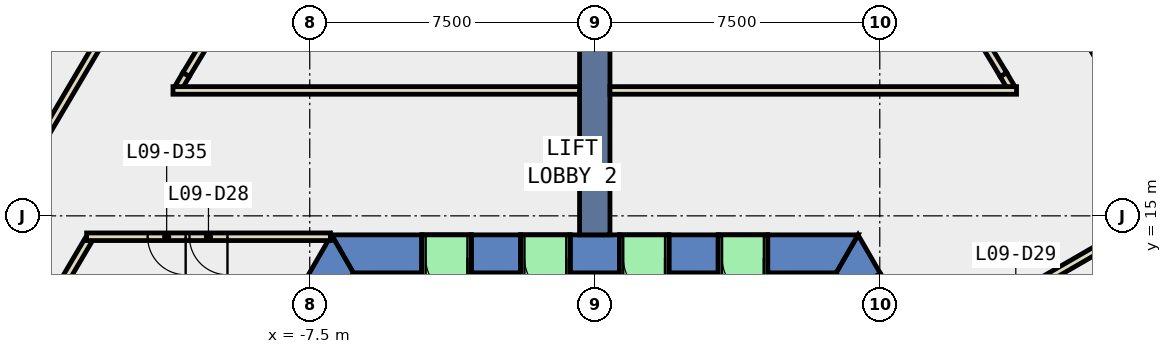
"""IFC4 building model, lengths in metres.
Left out: names, types, materials, properties, quantities, classifications, styles, units other than length and angle.
Written with IfcOpenShell. Run it as: python <this file> out.ifc"""

import sys

from ifc_helpers import new_model, si_unit, direction, frame, frame_2d, origin, place, context, subcontext, project, spatial, polyline, rectangle, outline, extrude, element, fill, save


model = new_model("IFC4")
c1 = context("Model", 3, precision=1e-05, world=origin(), true_north=direction((0.0, 1.0)))
c2 = subcontext(c1, "Body", "Model", "MODEL_VIEW")
j1 = project(units=[si_unit("LENGTHUNIT", "METRE"), si_unit("PLANEANGLEUNIT", "RADIAN")], contexts=[c1])
p1 = place(None, origin())
s1 = spatial("IfcSite", under=j1, at=p1, CompositionType="ELEMENT")
p2 = place(p1, origin())
s2 = spatial("IfcBuilding", under=s1, at=p2, CompositionType="ELEMENT")
p3 = place(p2, frame((0.0, 0.0, 47.6)))
s3 = spatial("IfcBuildingStorey", under=s2, at=p3, CompositionType="ELEMENT", Elevation=47.6)
p4 = place(p3, frame((0.0, 0.0, -0.4)))
e1 = element("IfcWall", 1, at=p4, inside=s3, PredefinedType="SHEAR", context=c2, shape_type="SweptSolid", body=[
    extrude(outline(polyline([(6.651, 12.98), (7.517, 13.48), (6.928, 14.5), (6.351, 13.5), (6.651, 12.98)])), origin(), (0.0, 0.0, 1.0), 4.2),
])
p5 = place(p3, frame((0.0, 0.0, 3.6)))
e2 = element("IfcWall", 2, at=p5, inside=s3, PredefinedType="SHEAR", context=c2, shape_type="SweptSolid", body=[
    extrude(outline(polyline([(7.517, 13.48), (6.651, 12.98), (7.651, 11.248), (8.517, 11.748), (7.517, 13.48)])), origin(), (0.0, 0.0, 1.0), 0.2),
])
p6 = place(p3, frame((0.0, 0.0, -0.4)))
e3 = element("IfcWall", 3, at=p6, inside=s3, PredefinedType="SHEAR", context=c2, shape_type="SweptSolid", body=[
    extrude(outline(polyline([(4.55, 14.5), (4.55, 13.5), (6.351, 13.5), (6.928, 14.5), (4.55, 14.5)])), origin(), (0.0, 0.0, 1.0), 4.2),
])
p7 = place(p3, frame((0.0, 0.0, -0.4)))
e4 = element("IfcWall", 4, at=p7, inside=s3, PredefinedType="SHEAR", context=c2, shape_type="SweptSolid", body=[
    extrude(outline(polyline([(1.95, 14.5), (1.95, 13.5), (3.25, 13.5), (3.25, 14.5), (1.95, 14.5)])), origin(), (0.0, 0.0, 1.0), 4.2),
])
p8 = place(p3, frame((0.0, 0.0, -0.4)))
e5 = element("IfcWall", 5, at=p8, inside=s3, PredefinedType="SHEAR", context=c2, shape_type="SweptSolid", body=[
    extrude(outline(polyline([(-0.65, 14.5), (-0.65, 13.5), (0.65, 13.5), (0.65, 14.5), (-0.65, 14.5)])), origin(), (0.0, 0.0, 1.0), 4.2),
])
p9 = place(p3, frame((0.0, 0.0, -0.4)))
e6 = element("IfcWall", 6, at=p9, inside=s3, PredefinedType="SHEAR", context=c2, shape_type="SweptSolid", body=[
    extrude(outline(polyline([(-3.25, 14.5), (-3.25, 13.5), (-1.95, 13.5), (-1.95, 14.5), (-3.25, 14.5)])), origin(), (0.0, 0.0, 1.0), 4.2),
])
p10 = place(p3, frame((0.0, 0.0, -0.4)))
e7 = element("IfcWall", 7, at=p10, inside=s3, PredefinedType="SHEAR", context=c2, shape_type="SweptSolid", body=[
    extrude(outline(polyline([(-4.55, 13.5), (-4.55, 14.5), (-6.928, 14.5), (-6.351, 13.5), (-4.55, 13.5)])), origin(), (0.0, 0.0, 1.0), 4.2),
])
p11 = place(p3, frame((0.0, 0.0, 3.6)))
e8 = element("IfcWall", 8, at=p11, inside=s3, PredefinedType="SHEAR", context=c2, shape_type="SweptSolid", body=[
    extrude(outline(polyline([(3.25, 14.5), (3.25, 13.5), (4.55, 13.5), (4.55, 14.5), (3.25, 14.5)])), origin(), (0.0, 0.0, 1.0), 0.2),
])
p12 = place(p3, frame((0.0, 0.0, 3.6)))
e9 = element("IfcWall", 9, at=p12, inside=s3, PredefinedType="SHEAR", context=c2, shape_type="SweptSolid", body=[
    extrude(outline(polyline([(0.65, 14.5), (0.65, 13.5), (1.95, 13.5), (1.95, 14.5), (0.65, 14.5)])), origin(), (0.0, 0.0, 1.0), 0.2),
])
p13 = place(p3, frame((0.0, 0.0, 3.6)))
e10 = element("IfcWall", 10, at=p13, inside=s3, PredefinedType="SHEAR", context=c2, shape_type="SweptSolid", body=[
    extrude(outline(polyline([(-1.95, 14.5), (-1.95, 13.5), (-0.65, 13.5), (-0.65, 14.5), (-1.95, 14.5)])), origin(), (0.0, 0.0, 1.0), 0.2),
])
p14 = place(p3, frame((0.0, 0.0, 3.6)))
e11 = element("IfcWall", 11, at=p14, inside=s3, PredefinedType="SHEAR", context=c2, shape_type="SweptSolid", body=[
    extrude(outline(polyline([(-4.55, 14.5), (-4.55, 13.5), (-3.25, 13.5), (-3.25, 14.5), (-4.55, 14.5)])), origin(), (0.0, 0.0, 1.0), 0.2),
])
p15 = place(p3, frame((0.0, 0.0, -0.4)))
e12 = element("IfcWall", 12, at=p15, inside=s3, PredefinedType="SHEAR", context=c2, shape_type="SweptSolid", body=[
    extrude(outline(polyline([(-12.267, 5.252), (-11.402, 4.752), (-6.351, 13.5), (-6.928, 14.5), (-12.267, 5.252)])), origin(), (0.0, 0.0, 1.0), 4.2),
])
p16 = place(p3, frame((0.0, 14.5, -0.4), z_axis=(0.0, 0.0, 1.0), x_axis=(0.0, 1.0, 0.0)))
e13 = element("IfcWall", 13, at=p16, inside=s3, PredefinedType="SHEAR", context=c2, shape_type="SweptSolid", body=[
    extrude(rectangle(XDim=9.0, YDim=0.8, at=frame_2d((4.5, 0.0))), origin(), (0.0, 0.0, 1.0), 4.2),
])
p17 = place(p3, frame((-13.323, 14.364, 0.0), z_axis=(0.0, 0.0, 1.0), x_axis=(-0.508274698505, -0.861195001646, 0.0)))
e14 = element("IfcWall", 14, at=p17, inside=s3, PredefinedType="PARTITIONING", context=c2, shape_type="SweptSolid", body=[
    extrude(rectangle(XDim=1.828, YDim=0.2, at=frame_2d((0.914, 0.0))), origin(), (0.0, 0.0, 1.0), 3.8),
])
p18 = place(p3, frame((13.492, 14.274, 0.0), z_axis=(0.0, 0.0, 1.0), x_axis=(-0.866003598361, -0.5000377662, 0.0)))
e15 = element("IfcWall", 15, at=p18, inside=s3, PredefinedType="PARTITIONING", context=c2, shape_type="SweptSolid", body=[
    extrude(rectangle(XDim=5.071, YDim=0.2, at=frame_2d((2.536, 0.0))), origin(), (0.0, 0.0, 1.0), 3.8),
])
p19 = place(p18, frame((2.286, 0.0, 0.0)))
e16 = element("IfcOpeningElement", 16, at=p19, cuts=e15, PredefinedType="OPENING", context=c2, shape_type="SweptSolid", body=[
    extrude(rectangle(XDim=1.0, YDim=2.1, at=frame_2d((0.5, 1.05))), frame((0.0, 0.11, 0.0), z_axis=(0.0, -1.0, 0.0), x_axis=(1.0, 0.0, 0.0)), (0.0, 0.0, 1.0), 0.22),
])
p20 = place(p3, frame((10.948, 18.386, 0.0), z_axis=(0.0, 0.0, 1.0), x_axis=(-0.506880801681, 0.862016155815, 0.0)))
e17 = element("IfcWall", 17, at=p20, inside=s3, PredefinedType="PARTITIONING", context=c2, shape_type="SweptSolid", body=[
    extrude(rectangle(XDim=0.383, YDim=0.2, at=frame_2d((0.191, 0.0))), origin(), (0.0, 0.0, 1.0), 3.8),
])
p21 = place(p3, frame((10.754, 18.716, 0.0), z_axis=(0.0, 0.0, 1.0), x_axis=(-0.516755973305, 0.856132737403, 0.0)))
e18 = element("IfcWall", 18, at=p21, inside=s3, PredefinedType="PARTITIONING", context=c2, shape_type="SweptSolid", body=[
    extrude(rectangle(XDim=7.222, YDim=0.2, at=frame_2d((3.611, 0.0))), origin(), (0.0, 0.0, 1.0), 3.8),
])
p22 = place(p21, frame((3.111, 0.0, 0.0)))
e19 = element("IfcOpeningElement", 19, at=p22, cuts=e18, PredefinedType="OPENING", context=c2, shape_type="SweptSolid", body=[
    extrude(rectangle(XDim=1.0, YDim=2.1, at=frame_2d((0.5, 1.05))), frame((0.0, 0.11, 0.0), z_axis=(0.0, -1.0, 0.0), x_axis=(1.0, 0.0, 0.0)), (0.0, 0.0, 1.0), 0.22),
])
p23 = place(p3, frame((-7.022, 24.899, 0.0), z_axis=(0.0, 0.0, 1.0), x_axis=(-0.516755973305, -0.856132737403, 0.0)))
e20 = element("IfcWall", 20, at=p23, inside=s3, PredefinedType="PARTITIONING", context=c2, shape_type="SweptSolid", body=[
    extrude(rectangle(XDim=7.222, YDim=0.2, at=frame_2d((3.611, 0.0))), origin(), (0.0, 0.0, 1.0), 3.8),
])
p24 = place(p23, frame((3.111, 0.0, 0.0)))
e21 = element("IfcOpeningElement", 21, at=p24, cuts=e20, PredefinedType="OPENING", context=c2, shape_type="SweptSolid", body=[
    extrude(rectangle(XDim=1.0, YDim=2.1, at=frame_2d((0.5, 1.05))), frame((0.0, 0.11, 0.0), z_axis=(0.0, -1.0, 0.0), x_axis=(1.0, 0.0, 0.0)), (0.0, 0.0, 1.0), 0.22),
])
p25 = place(p3, frame((-10.754, 18.716, 0.0), z_axis=(0.0, 0.0, 1.0), x_axis=(-0.506880801681, -0.862016155815, 0.0)))
e22 = element("IfcWall", 22, at=p25, inside=s3, PredefinedType="PARTITIONING", context=c2, shape_type="SweptSolid", body=[
    extrude(rectangle(XDim=0.383, YDim=0.2, at=frame_2d((0.191, 0.0))), origin(), (0.0, 0.0, 1.0), 3.8),
])
p26 = place(p3, frame((12.815, 19.946, 0.0), z_axis=(0.0, 0.0, 1.0), x_axis=(0.508287536166, -0.861187424768, 0.0)))
e23 = element("IfcWall", 23, at=p26, inside=s3, PredefinedType="PARTITIONING", context=c2, shape_type="SweptSolid", body=[
    extrude(rectangle(XDim=7.169, YDim=0.2, at=frame_2d((3.584, 0.0))), origin(), (0.0, 0.0, 1.0), 3.8),
])
p27 = place(p3, frame((-14.618, 16.891, 0.0), z_axis=(0.0, 0.0, 1.0), x_axis=(0.508267810274, 0.861199067022, 0.0)))
e24 = element("IfcWall", 24, at=p27, inside=s3, PredefinedType="PARTITIONING", context=c2, shape_type="SweptSolid", body=[
    extrude(rectangle(XDim=3.547, YDim=0.2, at=frame_2d((1.774, 0.0))), origin(), (0.0, 0.0, 1.0), 3.8),
])
p28 = place(p3, frame((-6.957, 14.45, 0.0), z_axis=(0.0, 0.0, 1.0), x_axis=(-1.0, 0.0, 0.0)))
e25 = element("IfcWall", 25, at=p28, inside=s3, PredefinedType="PARTITIONING", context=c2, shape_type="SweptSolid", body=[
    extrude(rectangle(XDim=6.415, YDim=0.2, at=frame_2d((3.208, 0.0))), origin(), (0.0, 0.0, 1.0), 3.8),
])
p29 = place(p28, frame((2.708, 0.0, 0.0)))
e26 = element("IfcOpeningElement", 26, at=p29, cuts=e25, PredefinedType="OPENING", context=c2, shape_type="SweptSolid", body=[
    extrude(rectangle(XDim=1.0, YDim=2.1, at=frame_2d((0.5, 1.05))), frame((0.0, 0.11, 0.0), z_axis=(0.0, -1.0, 0.0), x_axis=(1.0, 0.0, 0.0)), (0.0, 0.0, 1.0), 0.22),
])
p30 = place(p28, frame((3.808, 0.0, 0.0)))
e27 = element("IfcOpeningElement", 27, at=p30, cuts=e25, PredefinedType="OPENING", context=c2, shape_type="SweptSolid", body=[
    extrude(rectangle(XDim=1.0, YDim=2.1, at=frame_2d((0.5, 1.05))), frame((0.0, 0.11, 0.0), z_axis=(0.0, -1.0, 0.0), x_axis=(1.0, 0.0, 0.0)), (0.0, 0.0, 1.0), 0.22),
])
for number, where, z_axis, x_axis in (
    (28, (0.4, 18.3, 0.0), (0.0, 0.0, 1.0), (1.0, 0.0, 0.0)),
    (29, (-11.099, 18.3, 0.0), (0.0, 0.0, 1.0), (1.0, 0.0, 0.0)),
):
    element("IfcWall", number, at=place(p3, frame(where, z_axis=z_axis, x_axis=x_axis)), inside=s3, PredefinedType="PARTITIONING", context=c2, shape_type="SweptSolid", body=[
        extrude(rectangle(XDim=10.699, YDim=0.2, at=frame_2d((5.35, 0.0))), origin(), (0.0, 0.0, 1.0), 3.8),
    ])
p31 = place(p3, frame((8.43, 11.698, 0.0), z_axis=(0.0, 0.0, 1.0), x_axis=(-0.50002537861, 0.866010750942, 0.0)))
e30 = element("IfcWall", 30, at=p31, inside=s3, PredefinedType="PARTITIONING", context=c2, shape_type="SweptSolid", body=[
    extrude(rectangle(XDim=2.0, YDim=0.2, at=frame_2d((1.0, 0.0))), origin(), (0.0, 0.0, 1.0), 2.4),
])
p32 = place(p31, frame((0.19, 0.0, 0.0)))
e31 = element("IfcOpeningElement", 31, at=p32, cuts=e30, PredefinedType="OPENING", context=c2, shape_type="SweptSolid", body=[
    extrude(rectangle(XDim=1.8, YDim=2.1, at=frame_2d((0.9, 1.05))), frame((0.0, 0.11, 0.0), z_axis=(0.0, -1.0, 0.0), x_axis=(1.0, 0.0, 0.0)), (0.0, 0.0, 1.0), 0.22),
])
p33 = place(p3, frame((4.55, 13.9, 0.0), z_axis=(0.0, 0.0, 1.0), x_axis=(-1.0, 0.0, 0.0)))
e32 = element("IfcWall", 32, at=p33, inside=s3, PredefinedType="STANDARD", context=c2, shape_type="SweptSolid", body=[
    extrude(rectangle(XDim=1.3, YDim=1.2, at=frame_2d((0.65, 0.0))), origin(), (0.0, 0.0, 1.0), 2.4),
])
p34 = place(p33, frame((0.1, 0.0, 0.0)))
e33 = element("IfcOpeningElement", 33, at=p34, cuts=e32, PredefinedType="OPENING", context=c2, shape_type="SweptSolid", body=[
    extrude(rectangle(XDim=1.1, YDim=2.3, at=frame_2d((0.55, 1.15))), frame((0.0, 0.61, 0.0), z_axis=(0.0, -1.0, 0.0), x_axis=(1.0, 0.0, 0.0)), (0.0, 0.0, 1.0), 1.22),
])
p35 = place(p3, frame((1.95, 13.9, 0.0), z_axis=(0.0, 0.0, 1.0), x_axis=(-1.0, 0.0, 0.0)))
e34 = element("IfcWall", 34, at=p35, inside=s3, PredefinedType="STANDARD", context=c2, shape_type="SweptSolid", body=[
    extrude(rectangle(XDim=1.3, YDim=1.2, at=frame_2d((0.65, 0.0))), origin(), (0.0, 0.0, 1.0), 2.4),
])
p36 = place(p35, frame((0.1, 0.0, 0.0)))
e35 = element("IfcOpeningElement", 35, at=p36, cuts=e34, PredefinedType="OPENING", context=c2, shape_type="SweptSolid", body=[
    extrude(rectangle(XDim=1.1, YDim=2.3, at=frame_2d((0.55, 1.15))), frame((0.0, 0.61, 0.0), z_axis=(0.0, -1.0, 0.0), x_axis=(1.0, 0.0, 0.0)), (0.0, 0.0, 1.0), 1.22),
])
p37 = place(p3, frame((-0.65, 13.9, 0.0), z_axis=(0.0, 0.0, 1.0), x_axis=(-1.0, 0.0, 0.0)))
e36 = element("IfcWall", 36, at=p37, inside=s3, PredefinedType="STANDARD", context=c2, shape_type="SweptSolid", body=[
    extrude(rectangle(XDim=1.3, YDim=1.2, at=frame_2d((0.65, 0.0))), origin(), (0.0, 0.0, 1.0), 2.4),
])
p38 = place(p37, frame((0.1, 0.0, 0.0)))
e37 = element("IfcOpeningElement", 37, at=p38, cuts=e36, PredefinedType="OPENING", context=c2, shape_type="SweptSolid", body=[
    extrude(rectangle(XDim=1.1, YDim=2.3, at=frame_2d((0.55, 1.15))), frame((0.0, 0.61, 0.0), z_axis=(0.0, -1.0, 0.0), x_axis=(1.0, 0.0, 0.0)), (0.0, 0.0, 1.0), 1.22),
])
p39 = place(p3, frame((-3.25, 13.9, 0.0), z_axis=(0.0, 0.0, 1.0), x_axis=(-1.0, 0.0, 0.0)))
e38 = element("IfcWall", 38, at=p39, inside=s3, PredefinedType="STANDARD", context=c2, shape_type="SweptSolid", body=[
    extrude(rectangle(XDim=1.3, YDim=1.2, at=frame_2d((0.65, 0.0))), origin(), (0.0, 0.0, 1.0), 2.4),
])
p40 = place(p39, frame((0.1, 0.0, 0.0)))
e39 = element("IfcOpeningElement", 39, at=p40, cuts=e38, PredefinedType="OPENING", context=c2, shape_type="SweptSolid", body=[
    extrude(rectangle(XDim=1.1, YDim=2.3, at=frame_2d((0.55, 1.15))), frame((0.0, 0.61, 0.0), z_axis=(0.0, -1.0, 0.0), x_axis=(1.0, 0.0, 0.0)), (0.0, 0.0, 1.0), 1.22),
])
p41 = place(p29, origin())
e40 = element("IfcDoor", 40, at=p41, inside=s3, OperationType="SINGLE_SWING_LEFT", PredefinedType="DOOR", context=c2, shape_type="SweptSolid", body=[
    extrude(rectangle(XDim=1.0, YDim=2.1, at=frame_2d((0.5, 1.05))), frame((0.0, 0.025, 0.0), z_axis=(0.0, -1.0, 0.0), x_axis=(1.0, 0.0, 0.0)), (0.0, 0.0, 1.0), 0.05),
])
fill(e26, e40)
p42 = place(p30, origin())
e41 = element("IfcDoor", 41, at=p42, inside=s3, OperationType="SINGLE_SWING_RIGHT", PredefinedType="DOOR", context=c2, shape_type="SweptSolid", body=[
    extrude(rectangle(XDim=1.0, YDim=2.1, at=frame_2d((0.5, 1.05))), frame((0.0, 0.025, 0.0), z_axis=(0.0, -1.0, 0.0), x_axis=(1.0, 0.0, 0.0)), (0.0, 0.0, 1.0), 0.05),
])
fill(e27, e41)
p43 = place(p34, origin())
e42 = element("IfcDoor", 42, at=p43, inside=s3, OperationType="SLIDING_TO_LEFT", PredefinedType="DOOR", context=c2, shape_type="SweptSolid", body=[
    extrude(rectangle(XDim=1.1, YDim=2.3, at=frame_2d((0.55, 1.15))), frame((0.0, 0.025, 0.0), z_axis=(0.0, -1.0, 0.0), x_axis=(1.0, 0.0, 0.0)), (0.0, 0.0, 1.0), 0.05),
])
fill(e33, e42)
p44 = place(p36, origin())
e43 = element("IfcDoor", 43, at=p44, inside=s3, OperationType="SLIDING_TO_LEFT", PredefinedType="DOOR", context=c2, shape_type="SweptSolid", body=[
    extrude(rectangle(XDim=1.1, YDim=2.3, at=frame_2d((0.55, 1.15))), frame((0.0, 0.025, 0.0), z_axis=(0.0, -1.0, 0.0), x_axis=(1.0, 0.0, 0.0)), (0.0, 0.0, 1.0), 0.05),
])
fill(e35, e43)
p45 = place(p38, origin())
e44 = element("IfcDoor", 44, at=p45, inside=s3, OperationType="SLIDING_TO_LEFT", PredefinedType="DOOR", context=c2, shape_type="SweptSolid", body=[
    extrude(rectangle(XDim=1.1, YDim=2.3, at=frame_2d((0.55, 1.15))), frame((0.0, 0.025, 0.0), z_axis=(0.0, -1.0, 0.0), x_axis=(1.0, 0.0, 0.0)), (0.0, 0.0, 1.0), 0.05),
])
fill(e37, e44)
p46 = place(p40, origin())
e45 = element("IfcDoor", 45, at=p46, inside=s3, OperationType="SLIDING_TO_LEFT", PredefinedType="DOOR", context=c2, shape_type="SweptSolid", body=[
    extrude(rectangle(XDim=1.1, YDim=2.3, at=frame_2d((0.55, 1.15))), frame((0.0, 0.025, 0.0), z_axis=(0.0, -1.0, 0.0), x_axis=(1.0, 0.0, 0.0)), (0.0, 0.0, 1.0), 0.05),
])
fill(e39, e45)
save(model, sys.argv[1])
